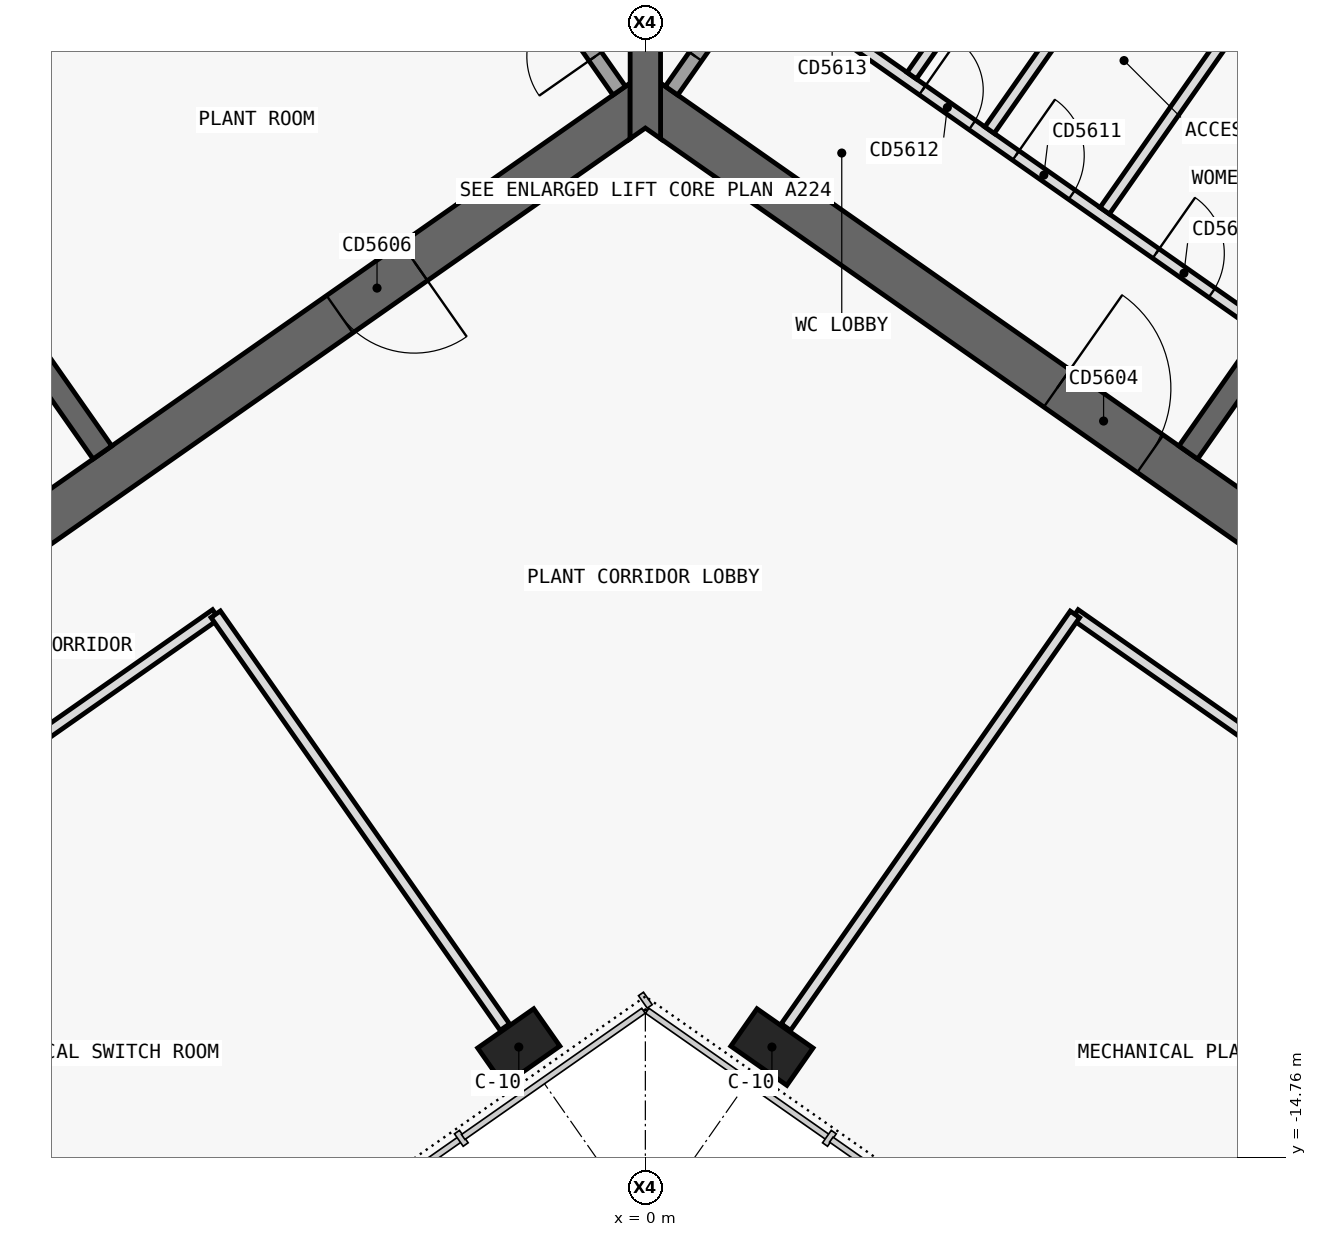
"""IFC4 building model, lengths in metres.
Left out: names, types, materials, properties, quantities, classifications, styles, units other than length and angle.
Written with IfcOpenShell. Run it as: python <this file> out.ifc"""

import sys

from ifc_helpers import new_model, si_unit, direction, frame, frame_2d, origin, origin_2d, place, context, subcontext, project, spatial, polyline, rectangle, outline, extrude, element, fill, save


model = new_model("IFC4")
c1 = context("Model", 3, precision=1e-05, world=origin(), true_north=direction((0.0, 1.0)))
c2 = subcontext(c1, "Body", "Model", "MODEL_VIEW")
j1 = project(units=[si_unit("LENGTHUNIT", "METRE"), si_unit("PLANEANGLEUNIT", "RADIAN")], contexts=[c1])
p1 = place(None, origin())
s1 = spatial("IfcSite", under=j1, at=p1, CompositionType="ELEMENT")
p2 = place(p1, origin())
s2 = spatial("IfcBuilding", under=s1, at=p2, CompositionType="ELEMENT")
p3 = place(p2, frame((0.0, 0.0, 313.3)))
s3 = spatial("IfcBuildingStorey", under=s2, at=p3, CompositionType="ELEMENT", Elevation=313.3)
p4 = place(p3, frame((-0.028, 12.066, 0.0), z_axis=(0.0, 0.0, 1.0), x_axis=(-0.819151382952, -0.573577380837, 0.0)))
e1 = element("IfcWall", 1, at=p4, inside=s3, PredefinedType="SHEAR", context=c2, shape_type="SweptSolid", body=[
    extrude(outline(polyline([(33.898, 0.3), (0.42, 0.3), (0.0, -0.3), (33.898, -0.3), (33.898, 0.3)])), origin(), (0.0, 0.0, 1.0), 5.5),
])
p5 = place(p3, frame((-0.028, -0.874, 0.0), z_axis=(0.0, 0.0, 1.0), x_axis=(-0.819150035022, -0.573579305871, 0.0)))
e2 = element("IfcWall", 2, at=p5, inside=s3, PredefinedType="SHEAR", context=c2, shape_type="SweptSolid", body=[
    extrude(outline(polyline([(26.476, 0.3), (0.42, 0.3), (0.0, -0.3), (26.476, -0.3), (26.476, 0.3)])), origin(), (0.0, 0.0, 1.0), 5.5),
])
p6 = place(p5, frame((3.676, 0.0, 0.0)))
e3 = element("IfcOpeningElement", 3, at=p6, cuts=e2, PredefinedType="OPENING", context=c2, shape_type="SweptSolid", body=[
    extrude(rectangle(XDim=1.2, YDim=2.1, at=frame_2d((0.6, 1.05))), frame((0.0, 0.31, 0.0), z_axis=(0.0, -1.0, 0.0), x_axis=(1.0, 0.0, 0.0)), (0.0, 0.0, 1.0), 0.62),
])
p7 = place(p5, frame((12.376, 0.0, 0.0)))
e4 = element("IfcOpeningElement", 4, at=p7, cuts=e2, PredefinedType="OPENING", context=c2, shape_type="SweptSolid", body=[
    extrude(rectangle(XDim=1.2, YDim=2.1, at=frame_2d((0.6, 1.05))), frame((0.0, 0.31, 0.0), z_axis=(0.0, -1.0, 0.0), x_axis=(1.0, 0.0, 0.0)), (0.0, 0.0, 1.0), 0.62),
])
p8 = place(p3, frame((-7.143, -5.49, 0.0), z_axis=(0.0, 0.0, 1.0), x_axis=(-0.573617744349, 0.819123118565, 0.0)))
e5 = element("IfcWall", 5, at=p8, inside=s3, PredefinedType="SHEAR", context=c2, shape_type="SweptSolid", body=[
    extrude(outline(polyline([(4.85, 0.15), (0.0, 0.15), (0.0, -0.15), (4.85, -0.15), (4.85, 0.15)])), origin(), (0.0, 0.0, 1.0), 5.5),
])
p9 = place(p3, frame((-2.638, 3.768, 0.0), z_axis=(0.0, 0.0, 1.0), x_axis=(-0.819155014212, -0.573572194837, 0.0)))
e6 = element("IfcWall", 6, at=p9, inside=s3, PredefinedType="SHEAR", context=c2, shape_type="SweptSolid", body=[
    extrude(outline(polyline([(26.4, 0.15), (0.0, 0.15), (0.0, -0.15), (26.4, -0.15), (26.4, 0.15)])), origin(), (0.0, 0.0, 1.0), 5.5),
])
p10 = place(p9, frame((14.552, 0.0, 0.0)))
e7 = element("IfcOpeningElement", 7, at=p10, cuts=e6, PredefinedType="OPENING", context=c2, shape_type="SweptSolid", body=[
    extrude(rectangle(XDim=1.0, YDim=2.1, at=frame_2d((0.5, 1.05))), frame((0.0, 0.16, 0.0), z_axis=(0.0, -1.0, 0.0), x_axis=(1.0, 0.0, 0.0)), (0.0, 0.0, 1.0), 0.32),
])
p11 = place(p9, frame((16.627, 0.0, 0.0)))
e8 = element("IfcOpeningElement", 8, at=p11, cuts=e6, PredefinedType="OPENING", context=c2, shape_type="SweptSolid", body=[
    extrude(rectangle(XDim=1.0, YDim=2.1, at=frame_2d((0.5, 1.05))), frame((0.0, 0.16, 0.0), z_axis=(0.0, -1.0, 0.0), x_axis=(1.0, 0.0, 0.0)), (0.0, 0.0, 1.0), 0.32),
])
p12 = place(p3, frame((0.028, 12.066, 0.0), z_axis=(0.0, 0.0, 1.0), x_axis=(0.819151382952, -0.573577380837, 0.0)))
e9 = element("IfcWall", 9, at=p12, inside=s3, PredefinedType="SHEAR", context=c2, shape_type="SweptSolid", body=[
    extrude(outline(polyline([(33.898, 0.3), (0.0, 0.3), (0.42, -0.3), (33.898, -0.3), (33.898, 0.3)])), origin(), (0.0, 0.0, 1.0), 5.5),
])
p13 = place(p3, frame((0.028, -0.874, 0.0), z_axis=(0.0, 0.0, 1.0), x_axis=(0.819150035022, -0.573579305871, 0.0)))
e10 = element("IfcWall", 10, at=p13, inside=s3, PredefinedType="SHEAR", context=c2, shape_type="SweptSolid", body=[
    extrude(outline(polyline([(26.476, 0.3), (0.0, 0.3), (0.42, -0.3), (26.476, -0.3), (26.476, 0.3)])), origin(), (0.0, 0.0, 1.0), 5.5),
])
p14 = place(p13, frame((6.576, 0.0, 0.0)))
e11 = element("IfcOpeningElement", 11, at=p14, cuts=e10, PredefinedType="OPENING", context=c2, shape_type="SweptSolid", body=[
    extrude(rectangle(XDim=1.5, YDim=2.1, at=frame_2d((0.75, 1.05))), frame((0.0, 0.31, 0.0), z_axis=(0.0, -1.0, 0.0), x_axis=(1.0, 0.0, 0.0)), (0.0, 0.0, 1.0), 0.62),
])
p15 = place(p13, frame((12.226, 0.0, 0.0)))
e12 = element("IfcOpeningElement", 12, at=p15, cuts=e10, PredefinedType="OPENING", context=c2, shape_type="SweptSolid", body=[
    extrude(rectangle(XDim=1.5, YDim=2.1, at=frame_2d((0.75, 1.05))), frame((0.0, 0.31, 0.0), z_axis=(0.0, -1.0, 0.0), x_axis=(1.0, 0.0, 0.0)), (0.0, 0.0, 1.0), 0.62),
])
p16 = place(p3, frame((7.143, -5.49, 0.0), z_axis=(0.0, 0.0, 1.0), x_axis=(0.573617744349, 0.819123118565, 0.0)))
e13 = element("IfcWall", 13, at=p16, inside=s3, PredefinedType="SHEAR", context=c2, shape_type="SweptSolid", body=[
    extrude(outline(polyline([(0.0, 0.15), (0.0, -0.15), (4.85, -0.15), (4.85, 0.15), (0.0, 0.15)])), origin(), (0.0, 0.0, 1.0), 5.5),
])
p17 = place(p3, frame((2.638, 3.768, 0.0), z_axis=(0.0, 0.0, 1.0), x_axis=(0.819155014212, -0.573572194837, 0.0)))
e14 = element("IfcWall", 14, at=p17, inside=s3, PredefinedType="SHEAR", context=c2, shape_type="SweptSolid", body=[
    extrude(outline(polyline([(0.0, 0.15), (0.0, -0.15), (26.4, -0.15), (26.4, 0.15), (0.0, 0.15)])), origin(), (0.0, 0.0, 1.0), 5.5),
])
p18 = place(p17, frame((9.637, 0.0, 0.0)))
e15 = element("IfcOpeningElement", 15, at=p18, cuts=e14, PredefinedType="OPENING", context=c2, shape_type="SweptSolid", body=[
    extrude(rectangle(XDim=1.2, YDim=2.1, at=frame_2d((0.6, 1.05))), frame((0.0, 0.16, 0.0), z_axis=(0.0, -1.0, 0.0), x_axis=(1.0, 0.0, 0.0)), (0.0, 0.0, 1.0), 0.32),
])
p19 = place(p17, frame((11.812, 0.0, 0.0)))
e16 = element("IfcOpeningElement", 16, at=p19, cuts=e14, PredefinedType="OPENING", context=c2, shape_type="SweptSolid", body=[
    extrude(rectangle(XDim=1.2, YDim=2.1, at=frame_2d((0.6, 1.05))), frame((0.0, 0.16, 0.0), z_axis=(0.0, -1.0, 0.0), x_axis=(1.0, 0.0, 0.0)), (0.0, 0.0, 1.0), 0.32),
])
p20 = place(p17, frame((13.988, 0.0, 0.0)))
e17 = element("IfcOpeningElement", 17, at=p20, cuts=e14, PredefinedType="OPENING", context=c2, shape_type="SweptSolid", body=[
    extrude(rectangle(XDim=1.2, YDim=2.1, at=frame_2d((0.6, 1.05))), frame((0.0, 0.16, 0.0), z_axis=(0.0, -1.0, 0.0), x_axis=(1.0, 0.0, 0.0)), (0.0, 0.0, 1.0), 0.32),
])
p21 = place(p17, frame((16.262, 0.0, 0.0)))
e18 = element("IfcOpeningElement", 18, at=p21, cuts=e14, PredefinedType="OPENING", context=c2, shape_type="SweptSolid", body=[
    extrude(rectangle(XDim=1.0, YDim=2.1, at=frame_2d((0.5, 1.05))), frame((0.0, 0.16, 0.0), z_axis=(0.0, -1.0, 0.0), x_axis=(1.0, 0.0, 0.0)), (0.0, 0.0, 1.0), 0.32),
])
p22 = place(p3, frame((0.0, -1.361, 0.0), z_axis=(0.0, 0.0, 1.0), x_axis=(0.0, 1.0, 0.0)))
e19 = element("IfcWall", 19, at=p22, inside=s3, PredefinedType="SHEAR", context=c2, shape_type="SweptSolid", body=[
    extrude(outline(polyline([(0.14, 0.2), (0.0, 0.2), (0.14, 0.0), (0.0, -0.2), (0.14, -0.2), (1.012, -0.2), (12.94, -0.2), (13.813, -0.2), (13.893, -0.2), (13.933, -0.172), (13.813, 0.0), (13.933, 0.172), (13.893, 0.2), (13.813, 0.2), (12.94, 0.2), (1.012, 0.2), (0.14, 0.2)])), origin(), (0.0, 0.0, 1.0), 5.5),
])
for number, where, z_axis, x_axis in (
    (20, (-1.665, -13.313, 0.0), (0.0, 0.0, 1.0), (-0.819, -0.574, 0.0)),
    (21, (1.665, -13.313, 0.0), (0.0, 0.0, 1.0), (0.819, -0.574, 0.0)),
):
    element("IfcColumn", number, at=place(p3, frame(where, z_axis=z_axis, x_axis=x_axis)), inside=s3, PredefinedType="COLUMN", context=c2, shape_type="SweptSolid", body=[
        extrude(rectangle(XDim=0.9, YDim=0.6, at=origin_2d()), origin(), (0.0, 0.0, 1.0), 5.5),
    ])
p23 = place(p3, frame((1.516, 0.77, 0.0), z_axis=(0.0, 0.0, 1.0), x_axis=(0.819146424436, -0.573584462249, 0.0)))
e22 = element("IfcWall", 22, at=p23, inside=s3, PredefinedType="PARTITIONING", context=c2, shape_type="SweptSolid", body=[
    extrude(rectangle(XDim=8.05, YDim=0.15, at=frame_2d((4.025, 0.0))), origin(), (0.0, 0.0, 1.0), 5.22),
])
p24 = place(p23, frame((0.7, 0.0, 0.0)))
e23 = element("IfcOpeningElement", 23, at=p24, cuts=e22, PredefinedType="OPENING", context=c2, shape_type="SweptSolid", body=[
    extrude(rectangle(XDim=0.9, YDim=2.1, at=frame_2d((0.45, 1.05))), frame((0.0, 0.085, 0.0), z_axis=(0.0, -1.0, 0.0), x_axis=(1.0, 0.0, 0.0)), (0.0, 0.0, 1.0), 0.17),
])
p25 = place(p23, frame((2.6, 0.0, 0.0)))
e24 = element("IfcOpeningElement", 24, at=p25, cuts=e22, PredefinedType="OPENING", context=c2, shape_type="SweptSolid", body=[
    extrude(rectangle(XDim=0.8, YDim=2.1, at=frame_2d((0.4, 1.05))), frame((0.0, 0.085, 0.0), z_axis=(0.0, -1.0, 0.0), x_axis=(1.0, 0.0, 0.0)), (0.0, 0.0, 1.0), 0.17),
])
p26 = place(p23, frame((4.1, 0.0, 0.0)))
e25 = element("IfcOpeningElement", 25, at=p26, cuts=e22, PredefinedType="OPENING", context=c2, shape_type="SweptSolid", body=[
    extrude(rectangle(XDim=0.9, YDim=2.1, at=frame_2d((0.45, 1.05))), frame((0.0, 0.085, 0.0), z_axis=(0.0, -1.0, 0.0), x_axis=(1.0, 0.0, 0.0)), (0.0, 0.0, 1.0), 0.17),
])
p27 = place(p23, frame((6.35, 0.0, 0.0)))
e26 = element("IfcOpeningElement", 26, at=p27, cuts=e22, PredefinedType="OPENING", context=c2, shape_type="SweptSolid", body=[
    extrude(rectangle(XDim=0.9, YDim=2.1, at=frame_2d((0.45, 1.05))), frame((0.0, 0.085, 0.0), z_axis=(0.0, -1.0, 0.0), x_axis=(1.0, 0.0, 0.0)), (0.0, 0.0, 1.0), 0.17),
])
p28 = place(p3, frame((3.504, -0.531, 0.0), z_axis=(0.0, 0.0, 1.0), x_axis=(0.573582013179, 0.819148139324, 0.0)))
e27 = element("IfcWall", 27, at=p28, inside=s3, PredefinedType="PARTITIONING", context=c2, shape_type="SweptSolid", body=[
    extrude(rectangle(XDim=2.875, YDim=0.15, at=frame_2d((1.438, 0.0))), origin(), (0.0, 0.0, 1.0), 5.22),
])
p29 = place(p3, frame((4.528, -1.248, 0.0), z_axis=(0.0, 0.0, 1.0), x_axis=(0.573621911162, 0.819120200602, 0.0)))
e28 = element("IfcWall", 28, at=p29, inside=s3, PredefinedType="PARTITIONING", context=c2, shape_type="SweptSolid", body=[
    extrude(rectangle(XDim=2.875, YDim=0.15, at=frame_2d((1.438, 0.0))), origin(), (0.0, 0.0, 1.0), 5.22),
])
p30 = place(p3, frame((6.044, -2.309, 0.0), z_axis=(0.0, 0.0, 1.0), x_axis=(0.573564930514, 0.819160100642, 0.0)))
e29 = element("IfcWall", 29, at=p30, inside=s3, PredefinedType="PARTITIONING", context=c2, shape_type="SweptSolid", body=[
    extrude(rectangle(XDim=2.875, YDim=0.15, at=frame_2d((1.438, 0.0))), origin(), (0.0, 0.0, 1.0), 5.22),
])
p31 = place(p3, frame((-0.344, -0.729, 0.0), z_axis=(0.0, 0.0, 1.0), x_axis=(-0.573560315113, 0.819163332265, 0.0)))
e30 = element("IfcWall", 30, at=p31, inside=s3, PredefinedType="SOLIDWALL", context=c2, shape_type="SweptSolid", body=[
    extrude(rectangle(XDim=4.85, YDim=0.2, at=frame_2d((2.425, 0.0))), origin(), (0.0, 0.0, 1.0), 5.22),
])
p32 = place(p31, frame((0.55, 0.0, 0.0)))
e31 = element("IfcOpeningElement", 31, at=p32, cuts=e30, PredefinedType="OPENING", context=c2, shape_type="SweptSolid", body=[
    extrude(rectangle(XDim=0.9, YDim=2.1, at=frame_2d((0.45, 1.05))), frame((0.0, 0.11, 0.0), z_axis=(0.0, -1.0, 0.0), x_axis=(1.0, 0.0, 0.0)), (0.0, 0.0, 1.0), 0.22),
])
p33 = place(p3, frame((0.344, -0.729, 0.0), z_axis=(0.0, 0.0, 1.0), x_axis=(0.573560315113, 0.819163332265, 0.0)))
e32 = element("IfcWall", 32, at=p33, inside=s3, PredefinedType="SOLIDWALL", context=c2, shape_type="SweptSolid", body=[
    extrude(rectangle(XDim=4.85, YDim=0.2, at=frame_2d((2.425, 0.0))), origin(), (0.0, 0.0, 1.0), 5.22),
])
p34 = place(p33, frame((0.55, 0.0, 0.0)))
e33 = element("IfcOpeningElement", 33, at=p34, cuts=e32, PredefinedType="OPENING", context=c2, shape_type="SweptSolid", body=[
    extrude(rectangle(XDim=0.9, YDim=2.1, at=frame_2d((0.45, 1.05))), frame((0.0, 0.11, 0.0), z_axis=(0.0, -1.0, 0.0), x_axis=(1.0, 0.0, 0.0)), (0.0, 0.0, 1.0), 0.22),
])
p35 = place(p3, frame((13.026, -12.783, 0.0), z_axis=(0.0, 0.0, 1.0), x_axis=(-0.81915291695, 0.57357519006, 0.0)))
e34 = element("IfcWall", 34, at=p35, inside=s3, PredefinedType="PARTITIONING", context=c2, shape_type="SweptSolid", body=[
    extrude(rectangle(XDim=9.002, YDim=0.15, at=frame_2d((4.501, 0.0))), origin(), (0.0, 0.0, 1.0), 5.2),
])
p36 = place(p35, frame((4.001, 0.0, 0.0)))
e35 = element("IfcOpeningElement", 35, at=p36, cuts=e34, PredefinedType="OPENING", context=c2, shape_type="SweptSolid", body=[
    extrude(rectangle(XDim=1.0, YDim=2.1, at=frame_2d((0.5, 1.05))), frame((0.0, 0.085, 0.0), z_axis=(0.0, -1.0, 0.0), x_axis=(1.0, 0.0, 0.0)), (0.0, 0.0, 1.0), 0.17),
])
p37 = place(p3, frame((-5.652, -7.62, 0.0), z_axis=(0.0, 0.0, 1.0), x_axis=(-0.81915291695, -0.57357519006, 0.0)))
e36 = element("IfcWall", 36, at=p37, inside=s3, PredefinedType="PARTITIONING", context=c2, shape_type="SweptSolid", body=[
    extrude(rectangle(XDim=9.002, YDim=0.15, at=frame_2d((4.501, 0.0))), origin(), (0.0, 0.0, 1.0), 5.2),
])
p38 = place(p37, frame((4.001, 0.0, 0.0)))
e37 = element("IfcOpeningElement", 37, at=p38, cuts=e36, PredefinedType="OPENING", context=c2, shape_type="SweptSolid", body=[
    extrude(rectangle(XDim=1.0, YDim=2.1, at=frame_2d((0.5, 1.05))), frame((0.0, 0.085, 0.0), z_axis=(0.0, -1.0, 0.0), x_axis=(1.0, 0.0, 0.0)), (0.0, 0.0, 1.0), 0.17),
])
p39 = place(p3, frame((1.849, -13.051, 0.0), z_axis=(0.0, 0.0, 1.0), x_axis=(0.57357355307, 0.819154063177, 0.0)))
e38 = element("IfcWall", 38, at=p39, inside=s3, PredefinedType="PARTITIONING", context=c2, shape_type="SweptSolid", body=[
    extrude(rectangle(XDim=6.63, YDim=0.15, at=frame_2d((3.315, 0.0))), origin(), (0.0, 0.0, 1.0), 5.2),
])
p40 = place(p3, frame((-1.849, -13.051, 0.0), z_axis=(0.0, 0.0, 1.0), x_axis=(-0.573575988258, 0.819152358047, 0.0)))
e39 = element("IfcWall", 39, at=p40, inside=s3, PredefinedType="PARTITIONING", context=c2, shape_type="SweptSolid", body=[
    extrude(rectangle(XDim=6.632, YDim=0.15, at=frame_2d((3.316, 0.0))), origin(), (0.0, 0.0, 1.0), 5.2),
])
p41 = place(p6, origin())
e40 = element("IfcDoor", 40, at=p41, inside=s3, OperationType="SINGLE_SWING_RIGHT", PredefinedType="DOOR", context=c2, shape_type="SweptSolid", body=[
    extrude(rectangle(XDim=1.2, YDim=2.1, at=frame_2d((0.6, 1.05))), frame((0.0, 0.025, 0.0), z_axis=(0.0, -1.0, 0.0), x_axis=(1.0, 0.0, 0.0)), (0.0, 0.0, 1.0), 0.05),
])
fill(e3, e40)
p42 = place(p25, origin())
e41 = element("IfcDoor", 41, at=p42, inside=s3, OperationType="SINGLE_SWING_RIGHT", PredefinedType="DOOR", context=c2, shape_type="SweptSolid", body=[
    extrude(rectangle(XDim=0.8, YDim=2.1, at=frame_2d((0.4, 1.05))), frame((0.0, 0.025, 0.0), z_axis=(0.0, -1.0, 0.0), x_axis=(1.0, 0.0, 0.0)), (0.0, 0.0, 1.0), 0.05),
])
fill(e24, e41)
p43 = place(p26, origin())
e42 = element("IfcDoor", 42, at=p43, inside=s3, OperationType="SINGLE_SWING_RIGHT", PredefinedType="DOOR", context=c2, shape_type="SweptSolid", body=[
    extrude(rectangle(XDim=0.9, YDim=2.1, at=frame_2d((0.45, 1.05))), frame((0.0, 0.025, 0.0), z_axis=(0.0, -1.0, 0.0), x_axis=(1.0, 0.0, 0.0)), (0.0, 0.0, 1.0), 0.05),
])
fill(e25, e42)
p44 = place(p27, origin())
e43 = element("IfcDoor", 43, at=p44, inside=s3, OperationType="SINGLE_SWING_RIGHT", PredefinedType="DOOR", context=c2, shape_type="SweptSolid", body=[
    extrude(rectangle(XDim=0.9, YDim=2.1, at=frame_2d((0.45, 1.05))), frame((0.0, 0.025, 0.0), z_axis=(0.0, -1.0, 0.0), x_axis=(1.0, 0.0, 0.0)), (0.0, 0.0, 1.0), 0.05),
])
fill(e26, e43)
p45 = place(p14, origin())
e44 = element("IfcDoor", 44, at=p45, inside=s3, OperationType="SINGLE_SWING_RIGHT", PredefinedType="DOOR", context=c2, shape_type="SweptSolid", body=[
    extrude(rectangle(XDim=1.5, YDim=2.1, at=frame_2d((0.75, 1.05))), frame((0.0, 0.025, 0.0), z_axis=(0.0, -1.0, 0.0), x_axis=(1.0, 0.0, 0.0)), (0.0, 0.0, 1.0), 0.05),
])
fill(e11, e44)
p46 = place(p32, origin())
e45 = element("IfcDoor", 45, at=p46, inside=s3, OperationType="SINGLE_SWING_RIGHT", PredefinedType="DOOR", context=c2, shape_type="SweptSolid", body=[
    extrude(rectangle(XDim=0.9, YDim=2.1, at=frame_2d((0.45, 1.05))), frame((0.0, 0.025, 0.0), z_axis=(0.0, -1.0, 0.0), x_axis=(1.0, 0.0, 0.0)), (0.0, 0.0, 1.0), 0.05),
])
fill(e31, e45)
p47 = place(p34, origin())
e46 = element("IfcDoor", 46, at=p47, inside=s3, OperationType="SINGLE_SWING_RIGHT", PredefinedType="DOOR", context=c2, shape_type="SweptSolid", body=[
    extrude(rectangle(XDim=0.9, YDim=2.1, at=frame_2d((0.45, 1.05))), frame((0.0, 0.025, 0.0), z_axis=(0.0, -1.0, 0.0), x_axis=(1.0, 0.0, 0.0)), (0.0, 0.0, 1.0), 0.05),
])
fill(e33, e46)
save(model, sys.argv[1])
